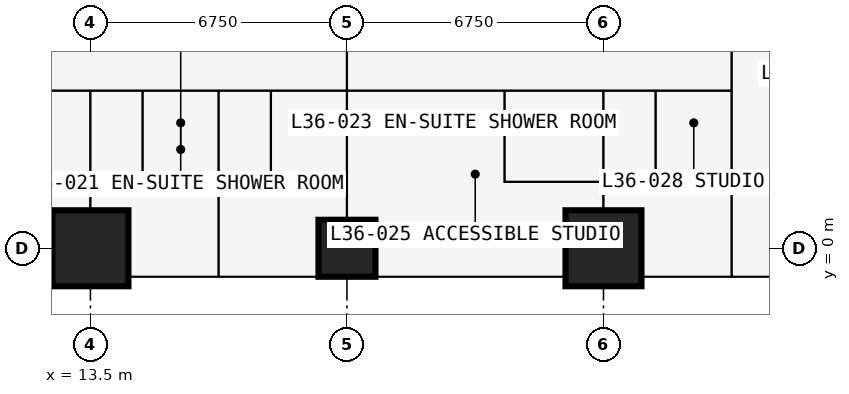
"""IFC4 building model, lengths in metres.
Left out: names, types, materials, properties, quantities, classifications, styles, units other than length and angle.
Written with IfcOpenShell. Run it as: python <this file> out.ifc"""

import sys

from ifc_helpers import new_model, si_unit, direction, frame, frame_2d, origin, origin_2d, place, context, subcontext, project, spatial, rectangle, extrude, element, fill, save


model = new_model("IFC4")
c1 = context("Model", 3, precision=1e-05, world=origin(), true_north=direction((0.0, 1.0)))
c2 = subcontext(c1, "Body", "Model", "MODEL_VIEW")
j1 = project(units=[si_unit("LENGTHUNIT", "METRE"), si_unit("PLANEANGLEUNIT", "RADIAN")], contexts=[c1])
p1 = place(None, origin())
s1 = spatial("IfcSite", under=j1, at=p1, CompositionType="ELEMENT")
p2 = place(p1, origin())
s2 = spatial("IfcBuilding", under=s1, at=p2, CompositionType="ELEMENT")
p3 = place(p2, frame((0.0, 0.0, 134.1)))
s3 = spatial("IfcBuildingStorey", under=s2, at=p3, CompositionType="ELEMENT", Elevation=134.1)
p4 = place(p3, frame((13.5, 0.0, 0.0), z_axis=(0.0, 0.0, 1.0), x_axis=(1.0, 0.0, 0.0)))
e1 = element("IfcColumn", 1, at=p4, inside=s3, PredefinedType="COLUMN", context=c2, shape_type="SweptSolid", body=[
    extrude(rectangle(XDim=2.0, YDim=2.0, at=origin_2d()), origin(), (0.0, 0.0, 1.0), 3.6),
])
p5 = place(p3, frame((20.25, 0.0, 0.0), z_axis=(0.0, 0.0, 1.0), x_axis=(1.0, 0.0, 0.0)))
e2 = element("IfcColumn", 2, at=p5, inside=s3, PredefinedType="COLUMN", context=c2, shape_type="SweptSolid", body=[
    extrude(rectangle(XDim=1.5, YDim=1.5, at=origin_2d()), origin(), (0.0, 0.0, 1.0), 3.6),
])
p6 = place(p3, frame((27.0, 0.0, 0.0), z_axis=(0.0, 0.0, 1.0), x_axis=(1.0, 0.0, 0.0)))
e3 = element("IfcColumn", 3, at=p6, inside=s3, PredefinedType="COLUMN", context=c2, shape_type="SweptSolid", body=[
    extrude(rectangle(XDim=2.0, YDim=2.0, at=origin_2d()), origin(), (0.0, 0.0, 1.0), 3.6),
])
p7 = place(p3, frame((27.0, -0.75, 0.0), z_axis=(0.0, 0.0, 1.0), x_axis=(-1.0, 0.0, 0.0)))
e4 = element("IfcWall", 4, at=p7, inside=s3, PredefinedType="SOLIDWALL", context=c2, shape_type="SweptSolid", body=[
    extrude(rectangle(XDim=6.75, YDim=0.15, at=frame_2d((3.375, 0.0))), origin(), (0.0, 0.0, 1.0), 3.3),
])
p8 = place(p7, frame((1.129, 0.0, 0.0)))
e5 = element("IfcOpeningElement", 5, at=p8, cuts=e4, PredefinedType="OPENING", context=c2, shape_type="SweptSolid", body=[
    extrude(rectangle(XDim=1.0, YDim=2.2, at=frame_2d((0.5, 1.1))), frame((0.0, 0.085, 0.0), z_axis=(0.0, -1.0, 0.0), x_axis=(1.0, 0.0, 0.0)), (0.0, 0.0, 1.0), 0.17),
])
p9 = place(p7, frame((2.258, 0.0, 0.9)))
e6 = element("IfcOpeningElement", 6, at=p9, cuts=e4, PredefinedType="OPENING", context=c2, shape_type="SweptSolid", body=[
    extrude(rectangle(XDim=0.9, YDim=1.8, at=frame_2d((0.45, 0.9))), frame((0.0, 0.085, 0.0), z_axis=(0.0, -1.0, 0.0), x_axis=(1.0, 0.0, 0.0)), (0.0, 0.0, 1.0), 0.17),
])
p10 = place(p7, frame((4.887, 0.0, 0.0)))
e7 = element("IfcOpeningElement", 7, at=p10, cuts=e4, PredefinedType="OPENING", context=c2, shape_type="SweptSolid", body=[
    extrude(rectangle(XDim=1.0, YDim=2.2, at=frame_2d((0.5, 1.1))), frame((0.0, 0.085, 0.0), z_axis=(0.0, -1.0, 0.0), x_axis=(1.0, 0.0, 0.0)), (0.0, 0.0, 1.0), 0.17),
])
p11 = place(p7, frame((3.575, 0.0, 0.9)))
e8 = element("IfcOpeningElement", 8, at=p11, cuts=e4, PredefinedType="OPENING", context=c2, shape_type="SweptSolid", body=[
    extrude(rectangle(XDim=1.2, YDim=1.8, at=frame_2d((0.6, 0.9))), frame((0.0, 0.085, 0.0), z_axis=(0.0, -1.0, 0.0), x_axis=(1.0, 0.0, 0.0)), (0.0, 0.0, 1.0), 0.17),
])
p12 = place(p3, frame((23.625, -0.85, 0.0), z_axis=(0.0, 0.0, 1.0), x_axis=(0.0, -1.0, 0.0)))
e9 = element("IfcWall", 9, at=p12, inside=s3, PredefinedType="USERDEFINED", context=c2, shape_type="SweptSolid", body=[
    extrude(rectangle(XDim=2.2, YDim=1.0, at=frame_2d((1.1, 0.0))), origin(), (0.0, 0.0, 1.0), 0.9),
])
p13 = place(p3, frame((6.75, 4.15, 0.0), z_axis=(0.0, 0.0, 1.0), x_axis=(1.0, 0.0, 0.0)))
e10 = element("IfcWall", 10, at=p13, inside=s3, PredefinedType="PARTITIONING", context=c2, shape_type="SweptSolid", body=[
    extrude(rectangle(XDim=23.625, YDim=0.1, at=frame_2d((11.812, 0.0))), origin(), (0.0, 0.0, 1.0), 3.3),
])
p14 = place(p13, frame((2.85, 0.0, 0.0)))
e11 = element("IfcOpeningElement", 11, at=p14, cuts=e10, PredefinedType="OPENING", context=c2, shape_type="SweptSolid", body=[
    extrude(rectangle(XDim=1.0, YDim=2.2, at=frame_2d((0.5, 1.1))), frame((0.0, 0.06, 0.0), z_axis=(0.0, -1.0, 0.0), x_axis=(1.0, 0.0, 0.0)), (0.0, 0.0, 1.0), 0.12),
])
p15 = place(p13, frame((6.95, 0.0, 0.0)))
e12 = element("IfcOpeningElement", 12, at=p15, cuts=e10, PredefinedType="OPENING", context=c2, shape_type="SweptSolid", body=[
    extrude(rectangle(XDim=0.95, YDim=2.2, at=frame_2d((0.475, 1.1))), frame((0.0, 0.06, 0.0), z_axis=(0.0, -1.0, 0.0), x_axis=(1.0, 0.0, 0.0)), (0.0, 0.0, 1.0), 0.12),
])
p16 = place(p13, frame((10.375, 0.0, 0.0)))
e13 = element("IfcOpeningElement", 13, at=p16, cuts=e10, PredefinedType="OPENING", context=c2, shape_type="SweptSolid", body=[
    extrude(rectangle(XDim=0.95, YDim=2.2, at=frame_2d((0.475, 1.1))), frame((0.0, 0.06, 0.0), z_axis=(0.0, -1.0, 0.0), x_axis=(1.0, 0.0, 0.0)), (0.0, 0.0, 1.0), 0.12),
])
p17 = place(p13, frame((15.1, 0.0, 0.0)))
e14 = element("IfcOpeningElement", 14, at=p17, cuts=e10, PredefinedType="OPENING", context=c2, shape_type="SweptSolid", body=[
    extrude(rectangle(XDim=0.95, YDim=2.2, at=frame_2d((0.475, 1.1))), frame((0.0, 0.06, 0.0), z_axis=(0.0, -1.0, 0.0), x_axis=(1.0, 0.0, 0.0)), (0.0, 0.0, 1.0), 0.12),
])
p18 = place(p13, frame((20.5, 0.0, 0.0)))
e15 = element("IfcOpeningElement", 15, at=p18, cuts=e10, PredefinedType="OPENING", context=c2, shape_type="SweptSolid", body=[
    extrude(rectangle(XDim=0.95, YDim=2.2, at=frame_2d((0.475, 1.1))), frame((0.0, 0.06, 0.0), z_axis=(0.0, -1.0, 0.0), x_axis=(1.0, 0.0, 0.0)), (0.0, 0.0, 1.0), 0.12),
])
p19 = place(p3, frame((13.5, -0.734, 0.0), z_axis=(0.0, 0.0, 1.0), x_axis=(0.0, 1.0, 0.0)))
e16 = element("IfcWall", 16, at=p19, inside=s3, PredefinedType="PARTITIONING", context=c2, shape_type="SweptSolid", body=[
    extrude(rectangle(XDim=4.884, YDim=0.15, at=frame_2d((2.442, 0.0))), origin(), (0.0, 0.0, 1.0), 2.802),
])
p20 = place(p3, frame((14.875, 1.95, 0.0), z_axis=(0.0, 0.0, 1.0), x_axis=(0.0, 1.0, 0.0)))
e17 = element("IfcWall", 17, at=p20, inside=s3, PredefinedType="PARTITIONING", context=c2, shape_type="SweptSolid", body=[
    extrude(rectangle(XDim=2.2, YDim=0.1, at=frame_2d((1.1, 0.0))), origin(), (0.0, 0.0, 1.0), 3.3),
])
p21 = place(p20, frame((0.65, 0.0, 0.0)))
e18 = element("IfcOpeningElement", 18, at=p21, cuts=e17, PredefinedType="OPENING", context=c2, shape_type="SweptSolid", body=[
    extrude(rectangle(XDim=0.9, YDim=2.2, at=frame_2d((0.45, 1.1))), frame((0.0, 0.06, 0.0), z_axis=(0.0, -1.0, 0.0), x_axis=(1.0, 0.0, 0.0)), (0.0, 0.0, 1.0), 0.12),
])
p22 = place(p3, frame((14.875, 1.95, 0.0), z_axis=(0.0, 0.0, 1.0), x_axis=(1.0, 0.0, 0.0)))
e19 = element("IfcWall", 19, at=p22, inside=s3, PredefinedType="PARTITIONING", context=c2, shape_type="SweptSolid", body=[
    extrude(rectangle(XDim=2.0, YDim=0.1, at=frame_2d((1.0, 0.0))), origin(), (0.0, 0.0, 1.0), 3.3),
])
p23 = place(p3, frame((16.875, -0.734, 0.0), z_axis=(0.0, 0.0, 1.0), x_axis=(0.0, 1.0, 0.0)))
e20 = element("IfcWall", 20, at=p23, inside=s3, PredefinedType="PARTITIONING", context=c2, shape_type="SweptSolid", body=[
    extrude(rectangle(XDim=4.884, YDim=0.175, at=frame_2d((2.442, 0.0))), origin(), (0.0, 0.0, 1.0), 3.3),
])
p24 = place(p3, frame((18.25, 1.95, 0.0), z_axis=(0.0, 0.0, 1.0), x_axis=(0.0, 1.0, 0.0)))
e21 = element("IfcWall", 21, at=p24, inside=s3, PredefinedType="PARTITIONING", context=c2, shape_type="SweptSolid", body=[
    extrude(rectangle(XDim=2.2, YDim=0.1, at=frame_2d((1.1, 0.0))), origin(), (0.0, 0.0, 1.0), 3.3),
])
p25 = place(p24, frame((0.65, 0.0, 0.0)))
e22 = element("IfcOpeningElement", 22, at=p25, cuts=e21, PredefinedType="OPENING", context=c2, shape_type="SweptSolid", body=[
    extrude(rectangle(XDim=0.9, YDim=2.2, at=frame_2d((0.45, 1.1))), frame((0.0, 0.06, 0.0), z_axis=(0.0, -1.0, 0.0), x_axis=(1.0, 0.0, 0.0)), (0.0, 0.0, 1.0), 0.12),
])
p26 = place(p3, frame((18.25, 1.95, 0.0), z_axis=(0.0, 0.0, 1.0), x_axis=(1.0, 0.0, 0.0)))
e23 = element("IfcWall", 23, at=p26, inside=s3, PredefinedType="PARTITIONING", context=c2, shape_type="SweptSolid", body=[
    extrude(rectangle(XDim=2.0, YDim=0.1, at=frame_2d((1.0, 0.0))), origin(), (0.0, 0.0, 1.0), 3.3),
])
p27 = place(p3, frame((20.25, -0.734, 0.0), z_axis=(0.0, 0.0, 1.0), x_axis=(0.0, 1.0, 0.0)))
e24 = element("IfcWall", 24, at=p27, inside=s3, PredefinedType="PARTITIONING", context=c2, shape_type="SweptSolid", body=[
    extrude(rectangle(XDim=12.034, YDim=0.15, at=frame_2d((6.017, 0.0))), origin(), (0.0, 0.0, 1.0), 2.802),
])
p28 = place(p3, frame((24.4, 1.75, 0.0), z_axis=(0.0, 0.0, 1.0), x_axis=(0.0, 1.0, 0.0)))
e25 = element("IfcWall", 25, at=p28, inside=s3, PredefinedType="PARTITIONING", context=c2, shape_type="SweptSolid", body=[
    extrude(rectangle(XDim=2.4, YDim=0.1, at=frame_2d((1.2, 0.0))), origin(), (0.0, 0.0, 1.0), 3.3),
])
p29 = place(p3, frame((24.4, 1.75, 0.0), z_axis=(0.0, 0.0, 1.0), x_axis=(1.0, 0.0, 0.0)))
e26 = element("IfcWall", 26, at=p29, inside=s3, PredefinedType="PARTITIONING", context=c2, shape_type="SweptSolid", body=[
    extrude(rectangle(XDim=2.6, YDim=0.1, at=frame_2d((1.3, 0.0))), origin(), (0.0, 0.0, 1.0), 3.3),
])
p30 = place(p29, frame((0.65, 0.0, 0.0)))
e27 = element("IfcOpeningElement", 27, at=p30, cuts=e26, PredefinedType="OPENING", context=c2, shape_type="SweptSolid", body=[
    extrude(rectangle(XDim=0.9, YDim=2.2, at=frame_2d((0.45, 1.1))), frame((0.0, 0.06, 0.0), z_axis=(0.0, -1.0, 0.0), x_axis=(1.0, 0.0, 0.0)), (0.0, 0.0, 1.0), 0.12),
])
p31 = place(p3, frame((27.0, -0.734, 0.0), z_axis=(0.0, 0.0, 1.0), x_axis=(0.0, 1.0, 0.0)))
e28 = element("IfcWall", 28, at=p31, inside=s3, PredefinedType="PARTITIONING", context=c2, shape_type="SweptSolid", body=[
    extrude(rectangle(XDim=4.884, YDim=0.175, at=frame_2d((2.442, 0.0))), origin(), (0.0, 0.0, 1.0), 2.802),
])
p32 = place(p3, frame((28.375, 1.95, 0.0), z_axis=(0.0, 0.0, 1.0), x_axis=(0.0, 1.0, 0.0)))
e29 = element("IfcWall", 29, at=p32, inside=s3, PredefinedType="PARTITIONING", context=c2, shape_type="SweptSolid", body=[
    extrude(rectangle(XDim=2.2, YDim=0.1, at=frame_2d((1.1, 0.0))), origin(), (0.0, 0.0, 1.0), 3.3),
])
p33 = place(p32, frame((0.65, 0.0, 0.0)))
e30 = element("IfcOpeningElement", 30, at=p33, cuts=e29, PredefinedType="OPENING", context=c2, shape_type="SweptSolid", body=[
    extrude(rectangle(XDim=0.9, YDim=2.2, at=frame_2d((0.45, 1.1))), frame((0.0, 0.06, 0.0), z_axis=(0.0, -1.0, 0.0), x_axis=(1.0, 0.0, 0.0)), (0.0, 0.0, 1.0), 0.12),
])
p34 = place(p3, frame((28.375, 1.95, 0.0), z_axis=(0.0, 0.0, 1.0), x_axis=(1.0, 0.0, 0.0)))
e31 = element("IfcWall", 31, at=p34, inside=s3, PredefinedType="PARTITIONING", context=c2, shape_type="SweptSolid", body=[
    extrude(rectangle(XDim=2.0, YDim=0.1, at=frame_2d((1.0, 0.0))), origin(), (0.0, 0.0, 1.0), 3.3),
])
p35 = place(p3, frame((30.375, -0.734, 0.0), z_axis=(0.0, 0.0, 1.0), x_axis=(0.0, 1.0, 0.0)))
e32 = element("IfcWall", 32, at=p35, inside=s3, PredefinedType="PARTITIONING", context=c2, shape_type="SweptSolid", body=[
    extrude(rectangle(XDim=12.034, YDim=0.15, at=frame_2d((6.017, 0.0))), origin(), (0.0, 0.0, 1.0), 3.3),
])
p36 = place(p35, frame((5.134, 0.0, 0.0)))
e33 = element("IfcOpeningElement", 33, at=p36, cuts=e32, PredefinedType="OPENING", context=c2, shape_type="SweptSolid", body=[
    extrude(rectangle(XDim=1.0, YDim=2.2, at=frame_2d((0.5, 1.1))), frame((0.0, 0.085, 0.0), z_axis=(0.0, -1.0, 0.0), x_axis=(1.0, 0.0, 0.0)), (0.0, 0.0, 1.0), 0.17),
])
p37 = place(p8, origin())
e34 = element("IfcDoor", 34, at=p37, inside=s3, OperationType="SINGLE_SWING_LEFT", PredefinedType="DOOR", context=c2, shape_type="SweptSolid", body=[
    extrude(rectangle(XDim=1.0, YDim=2.2, at=frame_2d((0.5, 1.1))), frame((0.0, 0.025, 0.0), z_axis=(0.0, -1.0, 0.0), x_axis=(1.0, 0.0, 0.0)), (0.0, 0.0, 1.0), 0.05),
])
fill(e5, e34)
p38 = place(p9, origin())
e35 = element("IfcWindow", 35, at=p38, inside=s3, PartitioningType="SINGLE_PANEL", PredefinedType="WINDOW", context=c2, shape_type="SweptSolid", body=[
    extrude(rectangle(XDim=0.9, YDim=1.8, at=frame_2d((0.45, 0.9))), frame((0.0, 0.03, 0.0), z_axis=(0.0, -1.0, 0.0), x_axis=(1.0, 0.0, 0.0)), (0.0, 0.0, 1.0), 0.06),
])
fill(e6, e35)
p39 = place(p10, origin())
e36 = element("IfcDoor", 36, at=p39, inside=s3, OperationType="SINGLE_SWING_RIGHT", PredefinedType="DOOR", context=c2, shape_type="SweptSolid", body=[
    extrude(rectangle(XDim=1.0, YDim=2.2, at=frame_2d((0.5, 1.1))), frame((0.0, 0.025, 0.0), z_axis=(0.0, -1.0, 0.0), x_axis=(1.0, 0.0, 0.0)), (0.0, 0.0, 1.0), 0.05),
])
fill(e7, e36)
p40 = place(p11, origin())
e37 = element("IfcWindow", 37, at=p40, inside=s3, PartitioningType="SINGLE_PANEL", PredefinedType="WINDOW", context=c2, shape_type="SweptSolid", body=[
    extrude(rectangle(XDim=1.2, YDim=1.8, at=frame_2d((0.6, 0.9))), frame((0.0, 0.03, 0.0), z_axis=(0.0, -1.0, 0.0), x_axis=(1.0, 0.0, 0.0)), (0.0, 0.0, 1.0), 0.06),
])
fill(e8, e37)
p41 = place(p15, origin())
e38 = element("IfcDoor", 38, at=p41, inside=s3, OperationType="SINGLE_SWING_LEFT", PredefinedType="DOOR", context=c2, shape_type="SweptSolid", body=[
    extrude(rectangle(XDim=0.95, YDim=2.2, at=frame_2d((0.475, 1.1))), frame((0.0, 0.025, 0.0), z_axis=(0.0, -1.0, 0.0), x_axis=(1.0, 0.0, 0.0)), (0.0, 0.0, 1.0), 0.05),
])
fill(e12, e38)
p42 = place(p21, origin())
e39 = element("IfcDoor", 39, at=p42, inside=s3, OperationType="SINGLE_SWING_RIGHT", PredefinedType="DOOR", context=c2, shape_type="SweptSolid", body=[
    extrude(rectangle(XDim=0.9, YDim=2.2, at=frame_2d((0.45, 1.1))), frame((0.0, 0.025, 0.0), z_axis=(0.0, -1.0, 0.0), x_axis=(1.0, 0.0, 0.0)), (0.0, 0.0, 1.0), 0.05),
])
fill(e18, e39)
p43 = place(p16, origin())
e40 = element("IfcDoor", 40, at=p43, inside=s3, OperationType="SINGLE_SWING_LEFT", PredefinedType="DOOR", context=c2, shape_type="SweptSolid", body=[
    extrude(rectangle(XDim=0.95, YDim=2.2, at=frame_2d((0.475, 1.1))), frame((0.0, 0.025, 0.0), z_axis=(0.0, -1.0, 0.0), x_axis=(1.0, 0.0, 0.0)), (0.0, 0.0, 1.0), 0.05),
])
fill(e13, e40)
p44 = place(p25, origin())
e41 = element("IfcDoor", 41, at=p44, inside=s3, OperationType="SINGLE_SWING_RIGHT", PredefinedType="DOOR", context=c2, shape_type="SweptSolid", body=[
    extrude(rectangle(XDim=0.9, YDim=2.2, at=frame_2d((0.45, 1.1))), frame((0.0, 0.025, 0.0), z_axis=(0.0, -1.0, 0.0), x_axis=(1.0, 0.0, 0.0)), (0.0, 0.0, 1.0), 0.05),
])
fill(e22, e41)
p45 = place(p17, origin())
e42 = element("IfcDoor", 42, at=p45, inside=s3, OperationType="SINGLE_SWING_LEFT", PredefinedType="DOOR", context=c2, shape_type="SweptSolid", body=[
    extrude(rectangle(XDim=0.95, YDim=2.2, at=frame_2d((0.475, 1.1))), frame((0.0, 0.025, 0.0), z_axis=(0.0, -1.0, 0.0), x_axis=(1.0, 0.0, 0.0)), (0.0, 0.0, 1.0), 0.05),
])
fill(e14, e42)
p46 = place(p30, origin())
e43 = element("IfcDoor", 43, at=p46, inside=s3, OperationType="SINGLE_SWING_RIGHT", PredefinedType="DOOR", context=c2, shape_type="SweptSolid", body=[
    extrude(rectangle(XDim=0.9, YDim=2.2, at=frame_2d((0.45, 1.1))), frame((0.0, 0.025, 0.0), z_axis=(0.0, -1.0, 0.0), x_axis=(1.0, 0.0, 0.0)), (0.0, 0.0, 1.0), 0.05),
])
fill(e27, e43)
p47 = place(p18, origin())
e44 = element("IfcDoor", 44, at=p47, inside=s3, OperationType="SINGLE_SWING_LEFT", PredefinedType="DOOR", context=c2, shape_type="SweptSolid", body=[
    extrude(rectangle(XDim=0.95, YDim=2.2, at=frame_2d((0.475, 1.1))), frame((0.0, 0.025, 0.0), z_axis=(0.0, -1.0, 0.0), x_axis=(1.0, 0.0, 0.0)), (0.0, 0.0, 1.0), 0.05),
])
fill(e15, e44)
p48 = place(p33, origin())
e45 = element("IfcDoor", 45, at=p48, inside=s3, OperationType="SINGLE_SWING_RIGHT", PredefinedType="DOOR", context=c2, shape_type="SweptSolid", body=[
    extrude(rectangle(XDim=0.9, YDim=2.2, at=frame_2d((0.45, 1.1))), frame((0.0, 0.025, 0.0), z_axis=(0.0, -1.0, 0.0), x_axis=(1.0, 0.0, 0.0)), (0.0, 0.0, 1.0), 0.05),
])
fill(e30, e45)
p49 = place(p36, origin())
e46 = element("IfcDoor", 46, at=p49, inside=s3, OperationType="SINGLE_SWING_LEFT", PredefinedType="DOOR", context=c2, shape_type="SweptSolid", body=[
    extrude(rectangle(XDim=1.0, YDim=2.2, at=frame_2d((0.5, 1.1))), frame((0.0, 0.025, 0.0), z_axis=(0.0, -1.0, 0.0), x_axis=(1.0, 0.0, 0.0)), (0.0, 0.0, 1.0), 0.05),
])
fill(e33, e46)
save(model, sys.argv[1])
